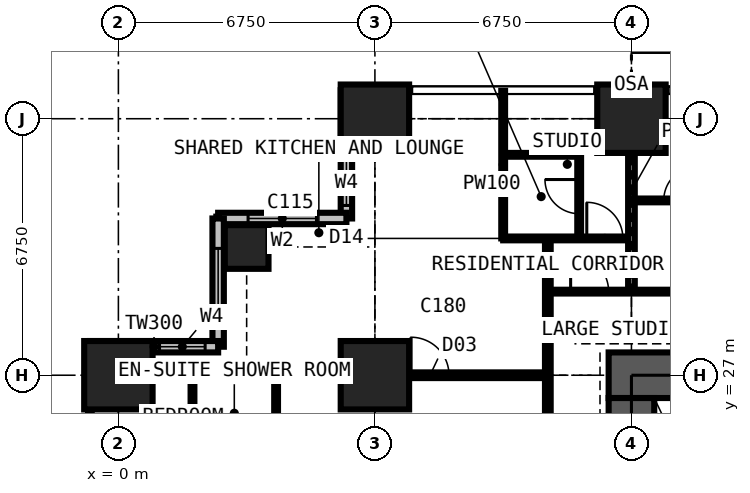
"""IFC4 building model, lengths in metres.
Left out: names, types, materials, properties, quantities, classifications, styles, units other than length and angle.
Written with IfcOpenShell. Run it as: python <this file> out.ifc"""

import sys

from ifc_helpers import new_model, si_unit, direction, frame, frame_2d, origin, origin_2d, place, context, subcontext, project, spatial, rectangle, extrude, element, fill, save


model = new_model("IFC4")
c1 = context("Model", 3, precision=1e-05, world=origin(), true_north=direction((0.0, 1.0)))
c2 = subcontext(c1, "Body", "Model", "MODEL_VIEW")
j1 = project(units=[si_unit("LENGTHUNIT", "METRE"), si_unit("PLANEANGLEUNIT", "RADIAN")], contexts=[c1])
p1 = place(None, origin())
s1 = spatial("IfcSite", under=j1, at=p1, CompositionType="ELEMENT")
p2 = place(p1, origin())
s2 = spatial("IfcBuilding", under=s1, at=p2, CompositionType="ELEMENT")
p3 = place(p2, frame((0.0, 0.0, 105.3)))
s3 = spatial("IfcBuildingStorey", under=s2, at=p3, CompositionType="ELEMENT", Elevation=105.3)
p4 = place(p3, frame((0.0, 27.0, 0.0), z_axis=(0.0, 0.0, 1.0), x_axis=(1.0, 0.0, 0.0)))
e1 = element("IfcColumn", 1, at=p4, inside=s3, PredefinedType="COLUMN", context=c2, shape_type="SweptSolid", body=[
    extrude(rectangle(XDim=1.8, YDim=1.8, at=origin_2d()), origin(), (0.0, 0.0, 1.0), 3.6),
])
p5 = place(p3, frame((3.375, 30.375, 0.0), z_axis=(0.0, 0.0, 1.0), x_axis=(1.0, 0.0, 0.0)))
e2 = element("IfcColumn", 2, at=p5, inside=s3, PredefinedType="COLUMN", context=c2, shape_type="SweptSolid", body=[
    extrude(rectangle(XDim=1.15, YDim=1.15, at=origin_2d()), origin(), (0.0, 0.0, 1.0), 3.6),
])
for number, where, z_axis, x_axis in (
    (3, (6.75, 27.0, 0.0), (0.0, 0.0, 1.0), (1.0, 0.0, 0.0)),
    (4, (6.75, 33.75, 0.0), (0.0, 0.0, 1.0), (1.0, 0.0, 0.0)),
    (5, (13.5, 33.75, 0.0), (0.0, 0.0, 1.0), (1.0, 0.0, 0.0)),
):
    element("IfcColumn", number, at=place(p3, frame(where, z_axis=z_axis, x_axis=x_axis)), inside=s3, PredefinedType="COLUMN", context=c2, shape_type="SweptSolid", body=[
        extrude(rectangle(XDim=1.8, YDim=1.8, at=origin_2d()), origin(), (0.0, 0.0, 1.0), 3.6),
    ])
p6 = place(p3, frame((27.6, 27.0, 0.0), z_axis=(0.0, 0.0, 1.0), x_axis=(-1.0, 0.0, 0.0)))
e6 = element("IfcWall", 6, at=p6, inside=s3, PredefinedType="SHEAR", context=c2, shape_type="SweptSolid", body=[
    extrude(rectangle(XDim=14.7, YDim=1.2, at=frame_2d((7.35, 0.0))), origin(), (0.0, 0.0, 1.0), 3.6),
])
p7 = place(p6, frame((5.225, 0.0, 0.0)))
e7 = element("IfcOpeningElement", 7, at=p7, cuts=e6, PredefinedType="OPENING", context=c2, shape_type="SweptSolid", body=[
    extrude(rectangle(XDim=0.9, YDim=2.2, at=frame_2d((0.45, 1.1))), frame((0.0, 0.61, 0.0), z_axis=(0.0, -1.0, 0.0), x_axis=(1.0, 0.0, 0.0)), (0.0, 0.0, 1.0), 1.22),
])
p8 = place(p6, frame((8.2, 0.0, 0.0)))
e8 = element("IfcOpeningElement", 8, at=p8, cuts=e6, PredefinedType="OPENING", context=c2, shape_type="SweptSolid", body=[
    extrude(rectangle(XDim=1.0, YDim=2.2, at=frame_2d((0.5, 1.1))), frame((0.0, 0.61, 0.0), z_axis=(0.0, -1.0, 0.0), x_axis=(1.0, 0.0, 0.0)), (0.0, 0.0, 1.0), 1.22),
])
p9 = place(p3, frame((13.5, 26.4, 0.0), z_axis=(0.0, 0.0, 1.0), x_axis=(0.0, -1.0, 0.0)))
e9 = element("IfcWall", 9, at=p9, inside=s3, PredefinedType="SHEAR", context=c2, shape_type="SweptSolid", body=[
    extrude(rectangle(XDim=12.3, YDim=1.2, at=frame_2d((6.15, 0.0))), origin(), (0.0, 0.0, 1.0), 3.6),
])
p10 = place(p9, frame((7.45, 0.0, 0.0)))
e10 = element("IfcOpeningElement", 10, at=p10, cuts=e9, PredefinedType="OPENING", context=c2, shape_type="SweptSolid", body=[
    extrude(rectangle(XDim=1.2, YDim=2.2, at=frame_2d((0.6, 1.1))), frame((0.0, 0.61, 0.0), z_axis=(0.0, -1.0, 0.0), x_axis=(1.0, 0.0, 0.0)), (0.0, 0.0, 1.0), 1.22),
])
p11 = place(p3, frame((6.0, 34.5, 0.0), z_axis=(0.0, 0.0, 1.0), x_axis=(0.0, -1.0, 0.0)))
e11 = element("IfcWall", 11, at=p11, inside=s3, PredefinedType="SOLIDWALL", context=c2, shape_type="SweptSolid", body=[
    extrude(rectangle(XDim=3.375, YDim=0.3, at=frame_2d((1.688, 0.0))), origin(), (0.0, 0.0, 1.0), 3.375),
])
p12 = place(p11, frame((1.833, 0.0, 0.9)))
e12 = element("IfcOpeningElement", 12, at=p12, cuts=e11, PredefinedType="OPENING", context=c2, shape_type="SweptSolid", body=[
    extrude(rectangle(XDim=1.2, YDim=1.8, at=frame_2d((0.6, 0.9))), frame((0.0, 0.16, 0.0), z_axis=(0.0, -1.0, 0.0), x_axis=(1.0, 0.0, 0.0)), (0.0, 0.0, 1.0), 0.32),
])
p13 = place(p3, frame((6.0, 31.125, 0.0), z_axis=(0.0, 0.0, 1.0), x_axis=(-1.0, 0.0, 0.0)))
e13 = element("IfcWall", 13, at=p13, inside=s3, PredefinedType="SOLIDWALL", context=c2, shape_type="SweptSolid", body=[
    extrude(rectangle(XDim=3.375, YDim=0.3, at=frame_2d((1.688, 0.0))), origin(), (0.0, 0.0, 1.0), 3.375),
])
p14 = place(p13, frame((0.788, 0.0, 0.6)))
e14 = element("IfcOpeningElement", 14, at=p14, cuts=e13, PredefinedType="OPENING", context=c2, shape_type="SweptSolid", body=[
    extrude(rectangle(XDim=1.8, YDim=2.1, at=frame_2d((0.9, 1.05))), frame((0.0, 0.16, 0.0), z_axis=(0.0, -1.0, 0.0), x_axis=(1.0, 0.0, 0.0)), (0.0, 0.0, 1.0), 0.32),
])
p15 = place(p3, frame((2.625, 31.125, 0.0), z_axis=(0.0, 0.0, 1.0), x_axis=(0.0, -1.0, 0.0)))
e15 = element("IfcWall", 15, at=p15, inside=s3, PredefinedType="SOLIDWALL", context=c2, shape_type="SweptSolid", body=[
    extrude(rectangle(XDim=3.375, YDim=0.3, at=frame_2d((1.688, 0.0))), origin(), (0.0, 0.0, 1.0), 3.375),
])
p16 = place(p15, frame((0.788, 0.0, 0.6)))
e16 = element("IfcOpeningElement", 16, at=p16, cuts=e15, PredefinedType="OPENING", context=c2, shape_type="SweptSolid", body=[
    extrude(rectangle(XDim=1.8, YDim=2.1, at=frame_2d((0.9, 1.05))), frame((0.0, 0.16, 0.0), z_axis=(0.0, -1.0, 0.0), x_axis=(1.0, 0.0, 0.0)), (0.0, 0.0, 1.0), 0.32),
])
p17 = place(p3, frame((2.625, 27.75, 0.0), z_axis=(0.0, 0.0, 1.0), x_axis=(-1.0, 0.0, 0.0)))
e17 = element("IfcWall", 17, at=p17, inside=s3, PredefinedType="SOLIDWALL", context=c2, shape_type="SweptSolid", body=[
    extrude(rectangle(XDim=3.375, YDim=0.3, at=frame_2d((1.688, 0.0))), origin(), (0.0, 0.0, 1.0), 3.375),
])
p18 = place(p17, frame((0.343, 0.0, 0.9)))
e18 = element("IfcOpeningElement", 18, at=p18, cuts=e17, PredefinedType="OPENING", context=c2, shape_type="SweptSolid", body=[
    extrude(rectangle(XDim=1.2, YDim=1.8, at=frame_2d((0.6, 0.9))), frame((0.0, 0.16, 0.0), z_axis=(0.0, -1.0, 0.0), x_axis=(1.0, 0.0, 0.0)), (0.0, 0.0, 1.0), 0.32),
])
p19 = place(p3, frame((-0.734, 27.0, 0.0), z_axis=(0.0, 0.0, 1.0), x_axis=(1.0, 0.0, 0.0)))
e19 = element("IfcWall", 19, at=p19, inside=s3, PredefinedType="PARTITIONING", context=c2, shape_type="SweptSolid", body=[
    extrude(rectangle(XDim=12.034, YDim=0.15, at=frame_2d((6.017, 0.0))), origin(), (0.0, 0.0, 1.0), 2.806),
])
p20 = place(p19, frame((8.434, 0.0, 0.0)))
e20 = element("IfcOpeningElement", 20, at=p20, cuts=e19, PredefinedType="OPENING", context=c2, shape_type="SweptSolid", body=[
    extrude(rectangle(XDim=1.0, YDim=2.2, at=frame_2d((0.5, 1.1))), frame((0.0, 0.085, 0.0), z_axis=(0.0, -1.0, 0.0), x_axis=(1.0, 0.0, 0.0)), (0.0, 0.0, 1.0), 0.17),
])
p21 = place(p3, frame((1.95, 25.0, 0.0), z_axis=(0.0, 0.0, 1.0), x_axis=(0.0, 1.0, 0.0)))
e21 = element("IfcWall", 21, at=p21, inside=s3, PredefinedType="PARTITIONING", context=c2, shape_type="SweptSolid", body=[
    extrude(rectangle(XDim=2.0, YDim=0.1, at=frame_2d((1.0, 0.0))), origin(), (0.0, 0.0, 1.0), 3.375),
])
p22 = place(p3, frame((4.15, 10.125, 0.0), z_axis=(0.0, 0.0, 1.0), x_axis=(0.0, 1.0, 0.0)))
e22 = element("IfcWall", 22, at=p22, inside=s3, PredefinedType="PARTITIONING", context=c2, shape_type="SweptSolid", body=[
    extrude(rectangle(XDim=16.875, YDim=0.1, at=frame_2d((8.438, 0.0))), origin(), (0.0, 0.0, 1.0), 3.375),
])
p23 = place(p22, frame((13.7, 0.0, 0.0)))
e23 = element("IfcOpeningElement", 23, at=p23, cuts=e22, PredefinedType="OPENING", context=c2, shape_type="SweptSolid", body=[
    extrude(rectangle(XDim=0.95, YDim=2.2, at=frame_2d((0.475, 1.1))), frame((0.0, 0.06, 0.0), z_axis=(0.0, -1.0, 0.0), x_axis=(1.0, 0.0, 0.0)), (0.0, 0.0, 1.0), 0.12),
])
p24 = place(p22, frame((0.2, 0.0, 0.0)))
e24 = element("IfcOpeningElement", 24, at=p24, cuts=e22, PredefinedType="OPENING", context=c2, shape_type="SweptSolid", body=[
    extrude(rectangle(XDim=0.95, YDim=2.2, at=frame_2d((0.475, 1.1))), frame((0.0, 0.06, 0.0), z_axis=(0.0, -1.0, 0.0), x_axis=(1.0, 0.0, 0.0)), (0.0, 0.0, 1.0), 0.12),
])
p25 = place(p22, frame((3.625, 0.0, 0.0)))
e25 = element("IfcOpeningElement", 25, at=p25, cuts=e22, PredefinedType="OPENING", context=c2, shape_type="SweptSolid", body=[
    extrude(rectangle(XDim=0.95, YDim=2.2, at=frame_2d((0.475, 1.1))), frame((0.0, 0.06, 0.0), z_axis=(0.0, -1.0, 0.0), x_axis=(1.0, 0.0, 0.0)), (0.0, 0.0, 1.0), 0.12),
])
p26 = place(p22, frame((7.0, 0.0, 0.0)))
e26 = element("IfcOpeningElement", 26, at=p26, cuts=e22, PredefinedType="OPENING", context=c2, shape_type="SweptSolid", body=[
    extrude(rectangle(XDim=0.95, YDim=2.2, at=frame_2d((0.475, 1.1))), frame((0.0, 0.06, 0.0), z_axis=(0.0, -1.0, 0.0), x_axis=(1.0, 0.0, 0.0)), (0.0, 0.0, 1.0), 0.12),
])
p27 = place(p22, frame((10.375, 0.0, 0.0)))
e27 = element("IfcOpeningElement", 27, at=p27, cuts=e22, PredefinedType="OPENING", context=c2, shape_type="SweptSolid", body=[
    extrude(rectangle(XDim=0.95, YDim=2.2, at=frame_2d((0.475, 1.1))), frame((0.0, 0.06, 0.0), z_axis=(0.0, -1.0, 0.0), x_axis=(1.0, 0.0, 0.0)), (0.0, 0.0, 1.0), 0.12),
])
p28 = place(p3, frame((10.125, 30.6, 0.0), z_axis=(0.0, 0.0, 1.0), x_axis=(0.0, 1.0, 0.0)))
e28 = element("IfcWall", 28, at=p28, inside=s3, PredefinedType="PARTITIONING", context=c2, shape_type="SweptSolid", body=[
    extrude(rectangle(XDim=3.884, YDim=0.1, at=frame_2d((1.942, 0.0))), origin(), (0.0, 0.0, 1.0), 3.375),
])
p29 = place(p3, frame((10.125, 30.6, 0.0), z_axis=(0.0, 0.0, 1.0), x_axis=(1.0, 0.0, 0.0)))
e29 = element("IfcWall", 29, at=p29, inside=s3, PredefinedType="PARTITIONING", context=c2, shape_type="SweptSolid", body=[
    extrude(rectangle(XDim=3.375, YDim=0.1, at=frame_2d((1.688, 0.0))), origin(), (0.0, 0.0, 1.0), 3.375),
])
p30 = place(p29, frame((2.2, 0.0, 0.0)))
e30 = element("IfcOpeningElement", 30, at=p30, cuts=e29, PredefinedType="OPENING", context=c2, shape_type="SweptSolid", body=[
    extrude(rectangle(XDim=0.95, YDim=2.2, at=frame_2d((0.475, 1.1))), frame((0.0, 0.06, 0.0), z_axis=(0.0, -1.0, 0.0), x_axis=(1.0, 0.0, 0.0)), (0.0, 0.0, 1.0), 0.12),
])
p31 = place(p3, frame((10.125, 32.8, 0.0), z_axis=(0.0, 0.0, 1.0), x_axis=(1.0, 0.0, 0.0)))
e31 = element("IfcWall", 31, at=p31, inside=s3, PredefinedType="PARTITIONING", context=c2, shape_type="SweptSolid", body=[
    extrude(rectangle(XDim=2.0, YDim=0.1, at=frame_2d((1.0, 0.0))), origin(), (0.0, 0.0, 1.0), 3.375),
])
p32 = place(p3, frame((11.3, 11.3, 0.0), z_axis=(0.0, 0.0, 1.0), x_axis=(0.0, 1.0, 0.0)))
e32 = element("IfcWall", 32, at=p32, inside=s3, PredefinedType="PARTITIONING", context=c2, shape_type="SweptSolid", body=[
    extrude(rectangle(XDim=19.3, YDim=0.15, at=frame_2d((9.65, 0.0))), origin(), (0.0, 0.0, 1.0), 3.375),
])
p33 = place(p32, frame((13.525, 0.0, 0.0)))
e33 = element("IfcOpeningElement", 33, at=p33, cuts=e32, PredefinedType="OPENING", context=c2, shape_type="SweptSolid", body=[
    extrude(rectangle(XDim=1.0, YDim=2.2, at=frame_2d((0.5, 1.1))), frame((0.0, 0.085, 0.0), z_axis=(0.0, -1.0, 0.0), x_axis=(1.0, 0.0, 0.0)), (0.0, 0.0, 1.0), 0.17),
])
p34 = place(p32, frame((10.438, 0.0, 0.0)))
e34 = element("IfcOpeningElement", 34, at=p34, cuts=e32, PredefinedType="OPENING", context=c2, shape_type="SweptSolid", body=[
    extrude(rectangle(XDim=1.0, YDim=2.2, at=frame_2d((0.5, 1.1))), frame((0.0, 0.085, 0.0), z_axis=(0.0, -1.0, 0.0), x_axis=(1.0, 0.0, 0.0)), (0.0, 0.0, 1.0), 0.17),
])
p35 = place(p3, frame((11.3, 29.2, 0.0), z_axis=(0.0, 0.0, 1.0), x_axis=(1.0, 0.0, 0.0)))
e35 = element("IfcWall", 35, at=p35, inside=s3, PredefinedType="PARTITIONING", context=c2, shape_type="SweptSolid", body=[
    extrude(rectangle(XDim=19.075, YDim=0.1, at=frame_2d((9.538, 0.0))), origin(), (0.0, 0.0, 1.0), 3.375),
])
p36 = place(p35, frame((6.4, 0.0, 0.0)))
e36 = element("IfcOpeningElement", 36, at=p36, cuts=e35, PredefinedType="OPENING", context=c2, shape_type="SweptSolid", body=[
    extrude(rectangle(XDim=0.95, YDim=2.2, at=frame_2d((0.475, 1.1))), frame((0.0, 0.06, 0.0), z_axis=(0.0, -1.0, 0.0), x_axis=(1.0, 0.0, 0.0)), (0.0, 0.0, 1.0), 0.12),
])
p37 = place(p35, frame((13.15, 0.0, 0.0)))
e37 = element("IfcOpeningElement", 37, at=p37, cuts=e35, PredefinedType="OPENING", context=c2, shape_type="SweptSolid", body=[
    extrude(rectangle(XDim=0.95, YDim=2.2, at=frame_2d((0.475, 1.1))), frame((0.0, 0.06, 0.0), z_axis=(0.0, -1.0, 0.0), x_axis=(1.0, 0.0, 0.0)), (0.0, 0.0, 1.0), 0.12),
])
p38 = place(p35, frame((0.6, 0.0, 0.0)))
e38 = element("IfcOpeningElement", 38, at=p38, cuts=e35, PredefinedType="OPENING", context=c2, shape_type="SweptSolid", body=[
    extrude(rectangle(XDim=1.0, YDim=2.2, at=frame_2d((0.5, 1.1))), frame((0.0, 0.06, 0.0), z_axis=(0.0, -1.0, 0.0), x_axis=(1.0, 0.0, 0.0)), (0.0, 0.0, 1.0), 0.12),
])
p39 = place(p3, frame((12.125, 30.6, 0.0), z_axis=(0.0, 0.0, 1.0), x_axis=(0.0, 1.0, 0.0)))
e39 = element("IfcWall", 39, at=p39, inside=s3, PredefinedType="PARTITIONING", context=c2, shape_type="SweptSolid", body=[
    extrude(rectangle(XDim=2.2, YDim=0.1, at=frame_2d((1.1, 0.0))), origin(), (0.0, 0.0, 1.0), 3.375),
])
p40 = place(p39, frame((0.65, 0.0, 0.0)))
e40 = element("IfcOpeningElement", 40, at=p40, cuts=e39, PredefinedType="OPENING", context=c2, shape_type="SweptSolid", body=[
    extrude(rectangle(XDim=0.9, YDim=2.2, at=frame_2d((0.45, 1.1))), frame((0.0, 0.06, 0.0), z_axis=(0.0, -1.0, 0.0), x_axis=(1.0, 0.0, 0.0)), (0.0, 0.0, 1.0), 0.12),
])
p41 = place(p3, frame((13.5, 29.2, 0.0), z_axis=(0.0, 0.0, 1.0), x_axis=(0.0, 1.0, 0.0)))
e41 = element("IfcWall", 41, at=p41, inside=s3, PredefinedType="PARTITIONING", context=c2, shape_type="SweptSolid", body=[
    extrude(rectangle(XDim=5.284, YDim=0.175, at=frame_2d((2.642, 0.0))), origin(), (0.0, 0.0, 1.0), 2.61),
])
p42 = place(p3, frame((13.5, 31.6, 0.0), z_axis=(0.0, 0.0, 1.0), x_axis=(1.0, 0.0, 0.0)))
e42 = element("IfcWall", 42, at=p42, inside=s3, PredefinedType="PARTITIONING", context=c2, shape_type="SweptSolid", body=[
    extrude(rectangle(XDim=2.6, YDim=0.1, at=frame_2d((1.3, 0.0))), origin(), (0.0, 0.0, 1.0), 3.375),
])
p43 = place(p42, frame((0.85, 0.0, 0.0)))
e43 = element("IfcOpeningElement", 43, at=p43, cuts=e42, PredefinedType="OPENING", context=c2, shape_type="SweptSolid", body=[
    extrude(rectangle(XDim=0.9, YDim=2.2, at=frame_2d((0.45, 1.1))), frame((0.0, 0.06, 0.0), z_axis=(0.0, -1.0, 0.0), x_axis=(1.0, 0.0, 0.0)), (0.0, 0.0, 1.0), 0.12),
])
p44 = place(p12, origin())
e44 = element("IfcWindow", 44, at=p44, inside=s3, PartitioningType="SINGLE_PANEL", PredefinedType="WINDOW", context=c2, shape_type="SweptSolid", body=[
    extrude(rectangle(XDim=1.2, YDim=1.8, at=frame_2d((0.6, 0.9))), frame((0.0, 0.03, 0.0), z_axis=(0.0, -1.0, 0.0), x_axis=(1.0, 0.0, 0.0)), (0.0, 0.0, 1.0), 0.06),
])
fill(e12, e44)
p45 = place(p14, origin())
e45 = element("IfcWindow", 45, at=p45, inside=s3, PartitioningType="SINGLE_PANEL", PredefinedType="WINDOW", context=c2, shape_type="SweptSolid", body=[
    extrude(rectangle(XDim=1.8, YDim=2.1, at=frame_2d((0.9, 1.05))), frame((0.0, 0.03, 0.0), z_axis=(0.0, -1.0, 0.0), x_axis=(1.0, 0.0, 0.0)), (0.0, 0.0, 1.0), 0.06),
])
fill(e14, e45)
p46 = place(p16, origin())
e46 = element("IfcWindow", 46, at=p46, inside=s3, PartitioningType="SINGLE_PANEL", PredefinedType="WINDOW", context=c2, shape_type="SweptSolid", body=[
    extrude(rectangle(XDim=1.8, YDim=2.1, at=frame_2d((0.9, 1.05))), frame((0.0, 0.03, 0.0), z_axis=(0.0, -1.0, 0.0), x_axis=(1.0, 0.0, 0.0)), (0.0, 0.0, 1.0), 0.06),
])
fill(e16, e46)
p47 = place(p18, origin())
e47 = element("IfcWindow", 47, at=p47, inside=s3, PartitioningType="SINGLE_PANEL", PredefinedType="WINDOW", context=c2, shape_type="SweptSolid", body=[
    extrude(rectangle(XDim=1.2, YDim=1.8, at=frame_2d((0.6, 0.9))), frame((0.0, 0.03, 0.0), z_axis=(0.0, -1.0, 0.0), x_axis=(1.0, 0.0, 0.0)), (0.0, 0.0, 1.0), 0.06),
])
fill(e18, e47)
p48 = place(p43, origin())
e48 = element("IfcDoor", 48, at=p48, inside=s3, OperationType="SINGLE_SWING_RIGHT", PredefinedType="DOOR", context=c2, shape_type="SweptSolid", body=[
    extrude(rectangle(XDim=0.9, YDim=2.2, at=frame_2d((0.45, 1.1))), frame((0.0, 0.025, 0.0), z_axis=(0.0, -1.0, 0.0), x_axis=(1.0, 0.0, 0.0)), (0.0, 0.0, 1.0), 0.05),
])
fill(e43, e48)
p49 = place(p30, origin())
e49 = element("IfcDoor", 49, at=p49, inside=s3, OperationType="SINGLE_SWING_LEFT", PredefinedType="DOOR", context=c2, shape_type="SweptSolid", body=[
    extrude(rectangle(XDim=0.95, YDim=2.2, at=frame_2d((0.475, 1.1))), frame((0.0, 0.025, 0.0), z_axis=(0.0, -1.0, 0.0), x_axis=(1.0, 0.0, 0.0)), (0.0, 0.0, 1.0), 0.05),
])
fill(e30, e49)
p50 = place(p40, origin())
e50 = element("IfcDoor", 50, at=p50, inside=s3, OperationType="SINGLE_SWING_RIGHT", PredefinedType="DOOR", context=c2, shape_type="SweptSolid", body=[
    extrude(rectangle(XDim=0.9, YDim=2.2, at=frame_2d((0.45, 1.1))), frame((0.0, 0.025, 0.0), z_axis=(0.0, -1.0, 0.0), x_axis=(1.0, 0.0, 0.0)), (0.0, 0.0, 1.0), 0.05),
])
fill(e40, e50)
p51 = place(p38, origin())
e51 = element("IfcDoor", 51, at=p51, inside=s3, OperationType="SINGLE_SWING_LEFT", PredefinedType="DOOR", context=c2, shape_type="SweptSolid", body=[
    extrude(rectangle(XDim=1.0, YDim=2.2, at=frame_2d((0.5, 1.1))), frame((0.0, 0.025, 0.0), z_axis=(0.0, -1.0, 0.0), x_axis=(1.0, 0.0, 0.0)), (0.0, 0.0, 1.0), 0.05),
])
fill(e38, e51)
p52 = place(p20, origin())
e52 = element("IfcDoor", 52, at=p52, inside=s3, OperationType="SINGLE_SWING_LEFT", PredefinedType="DOOR", context=c2, shape_type="SweptSolid", body=[
    extrude(rectangle(XDim=1.0, YDim=2.2, at=frame_2d((0.5, 1.1))), frame((0.0, 0.025, 0.0), z_axis=(0.0, -1.0, 0.0), x_axis=(1.0, 0.0, 0.0)), (0.0, 0.0, 1.0), 0.05),
])
fill(e20, e52)
save(model, sys.argv[1])
